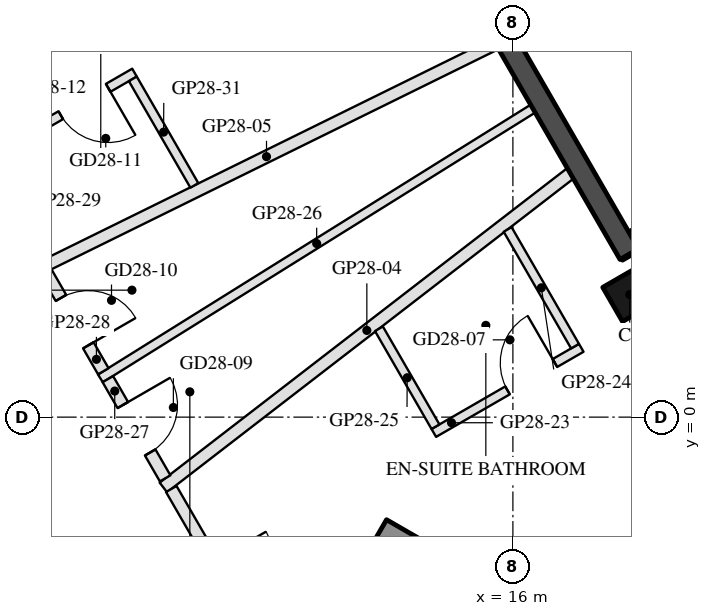
"""IFC4 building model, lengths in metres.
Left out: names, types, materials, properties, quantities, classifications, styles, units other than length and angle.
Written with IfcOpenShell. Run it as: python <this file> out.ifc"""

import sys

from ifc_helpers import new_model, si_unit, direction, frame, frame_2d, origin, origin_2d, place, context, subcontext, project, spatial, rectangle, hollow_rectangle, extrude, boolean, halfspace, element, fill, save


model = new_model("IFC4")
c1 = context("Model", 3, precision=1e-05, world=origin(), true_north=direction((0.0, 1.0)))
c2 = subcontext(c1, "Body", "Model", "MODEL_VIEW")
j1 = project(units=[si_unit("LENGTHUNIT", "METRE"), si_unit("PLANEANGLEUNIT", "RADIAN")], contexts=[c1])
p1 = place(None, origin())
s1 = spatial("IfcSite", under=j1, at=p1, CompositionType="ELEMENT")
p2 = place(p1, origin())
s2 = spatial("IfcBuilding", under=s1, at=p2, CompositionType="ELEMENT")
p3 = place(p2, frame((0.0, 0.0, 280.0)))
s3 = spatial("IfcBuildingStorey", under=s2, at=p3, CompositionType="ELEMENT", Elevation=280.0)
p4 = place(p3, frame((17.922, 2.016, 0.0), z_axis=(0.0, 0.0, 1.0), x_axis=(-0.5, 0.866025403784, 0.0)))
e1 = element("IfcColumn", 1, at=p4, inside=s3, PredefinedType="COLUMN", context=c2, shape_type="SweptSolid", body=[
    boolean("DIFFERENCE", extrude(hollow_rectangle(XDim=0.65, YDim=0.65, WallThickness=0.03, at=origin_2d()), origin(), (0.0, 0.0, 1.0), 3.7), halfspace(frame((0.0, 0.0, 0.04), z_axis=(0.0, 0.0, 1.0), x_axis=(1.0, 0.0, 0.0)), True)),
])
p5 = place(p3, frame((18.772, 3.344, 0.0), z_axis=(0.0, 0.0, 1.0), x_axis=(-0.866005645448, -0.500034220881, 0.0)))
e2 = element("IfcWall", 2, at=p5, inside=s3, PredefinedType="SOLIDWALL", context=c2, shape_type="SweptSolid", body=[
    extrude(rectangle(XDim=1.22, YDim=0.35, at=frame_2d((0.61, 0.0))), origin(), (0.0, 0.0, 1.0), 3.55),
])
p6 = place(p3, frame((17.913, 2.68, 0.0), z_axis=(0.0, 0.0, 1.0), x_axis=(-0.499985371027, 0.866033849661, 0.0)))
e3 = element("IfcWall", 3, at=p6, inside=s3, PredefinedType="SOLIDWALL", context=c2, shape_type="SweptSolid", body=[
    extrude(rectangle(XDim=6.055, YDim=0.35, at=frame_2d((3.028, 0.0))), origin(), (0.0, 0.0, 1.0), 3.55),
])
p7 = place(p6, frame((4.59, 0.0, 0.0)))
e4 = element("IfcOpeningElement", 4, at=p7, cuts=e3, PredefinedType="OPENING", context=c2, shape_type="SweptSolid", body=[
    extrude(rectangle(XDim=1.1, YDim=2.4, at=frame_2d((0.55, 1.2))), frame((0.0, 0.185, 0.0), z_axis=(0.0, -1.0, 0.0), x_axis=(1.0, 0.0, 0.0)), (0.0, 0.0, 1.0), 0.37),
])
p8 = place(p3, frame((13.797, -1.903, 0.0), z_axis=(0.0, 0.0, 1.0), x_axis=(0.866024688907, -0.500001238203, 0.0)))
e5 = element("IfcWall", 5, at=p8, inside=s3, PredefinedType="SHEAR", context=c2, shape_type="SweptSolid", body=[
    extrude(rectangle(XDim=12.129, YDim=0.5, at=frame_2d((6.064, 0.0))), origin(), (0.0, 0.0, 1.0), 3.5),
])
p9 = place(p3, frame((16.945, 4.008, 0.0), z_axis=(0.0, 0.0, 1.0), x_axis=(-0.791722394734, -0.610881043801, 0.0)))
e6 = element("IfcWall", 6, at=p9, inside=s3, PredefinedType="PARTITIONING", context=c2, shape_type="SweptSolid", body=[
    extrude(rectangle(XDim=8.454, YDim=0.2, at=frame_2d((4.227, 0.0))), origin(), (0.0, 0.0, 1.0), 3.16),
])
p10 = place(p3, frame((15.715, 6.139, 0.0), z_axis=(0.0, 0.0, 1.0), x_axis=(-0.897120508699, -0.44178591294, 0.0)))
e7 = element("IfcWall", 7, at=p10, inside=s3, PredefinedType="PARTITIONING", context=c2, shape_type="SweptSolid", body=[
    extrude(rectangle(XDim=8.397, YDim=0.2, at=frame_2d((4.198, 0.0))), origin(), (0.0, 0.0, 1.0), 3.16),
])
p11 = place(p3, frame((14.224, 10.521, 0.0), z_axis=(0.0, 0.0, 1.0), x_axis=(-0.866024341471, -0.500001839976, 0.0)))
e8 = element("IfcWall", 8, at=p11, inside=s3, PredefinedType="PARTITIONING", context=c2, shape_type="SweptSolid", body=[
    extrude(rectangle(XDim=9.279, YDim=0.2, at=frame_2d((4.639, 0.0))), origin(), (0.0, 0.0, 1.0), 3.16),
])
p12 = place(p3, frame((10.382, -1.182, 0.0), z_axis=(0.0, 0.0, 1.0), x_axis=(0.50002859319, -0.866008894869, 0.0)))
e9 = element("IfcWall", 9, at=p12, inside=s3, PredefinedType="PARTITIONING", context=c2, shape_type="SweptSolid", body=[
    extrude(rectangle(XDim=3.774, YDim=0.2, at=frame_2d((1.887, 0.0))), origin(), (0.0, 0.0, 1.0), 3.05),
])
p13 = place(p12, frame((1.387, 0.0, 0.0)))
e10 = element("IfcOpeningElement", 10, at=p13, cuts=e9, PredefinedType="OPENING", context=c2, shape_type="SweptSolid", body=[
    extrude(rectangle(XDim=1.0, YDim=2.1, at=frame_2d((0.5, 1.05))), frame((0.0, 0.11, 0.0), z_axis=(0.0, -1.0, 0.0), x_axis=(1.0, 0.0, 0.0)), (0.0, 0.0, 1.0), 0.22),
])
p14 = place(p3, frame((14.699, -0.26, 0.0), z_axis=(0.0, 0.0, 1.0), x_axis=(0.866034573852, 0.49998411664, 0.0)))
e11 = element("IfcWall", 11, at=p14, inside=s3, PredefinedType="PARTITIONING", context=c2, shape_type="SweptSolid", body=[
    extrude(rectangle(XDim=2.8, YDim=0.15, at=frame_2d((1.4, 0.0))), origin(), (0.0, 0.0, 1.0), 3.55),
])
p15 = place(p14, frame((1.4, 0.0, 0.0)))
e12 = element("IfcOpeningElement", 12, at=p15, cuts=e11, PredefinedType="OPENING", context=c2, shape_type="SweptSolid", body=[
    extrude(rectangle(XDim=0.9, YDim=2.1, at=frame_2d((0.45, 1.05))), frame((0.0, 0.085, 0.0), z_axis=(0.0, -1.0, 0.0), x_axis=(1.0, 0.0, 0.0)), (0.0, 0.0, 1.0), 0.17),
])
p16 = place(p3, frame((17.022, 1.167, 0.0), z_axis=(0.0, 0.0, 1.0), x_axis=(-0.499954515395, 0.866051662741, 0.0)))
e13 = element("IfcWall", 13, at=p16, inside=s3, PredefinedType="PARTITIONING", context=c2, shape_type="SweptSolid", body=[
    extrude(rectangle(XDim=2.216, YDim=0.15, at=frame_2d((1.108, 0.0))), origin(), (0.0, 0.0, 1.0), 3.05),
])
p17 = place(p3, frame((14.727, -0.158, 0.0), z_axis=(0.0, 0.0, 1.0), x_axis=(-0.499964847546, 0.866045698112, 0.0)))
e14 = element("IfcWall", 14, at=p17, inside=s3, PredefinedType="PARTITIONING", context=c2, shape_type="SweptSolid", body=[
    extrude(rectangle(XDim=1.86, YDim=0.15, at=frame_2d((0.93, 0.0))), origin(), (0.0, 0.0, 1.0), 3.05),
])
p18 = place(p3, frame((16.33, 5.074, 0.0), z_axis=(0.0, 0.0, 1.0), x_axis=(-0.848469139967, -0.52924485687, 0.0)))
e15 = element("IfcWall", 15, at=p18, inside=s3, PredefinedType="PARTITIONING", context=c2, shape_type="SweptSolid", body=[
    extrude(rectangle(XDim=8.384, YDim=0.15, at=frame_2d((4.192, 0.0))), origin(), (0.0, 0.0, 1.0), 3.16),
])
p19 = place(p3, frame((9.339, 0.625, 0.0), z_axis=(0.0, 0.0, 1.0), x_axis=(0.499999106059, -0.866025919901, 0.0)))
e16 = element("IfcWall", 16, at=p19, inside=s3, PredefinedType="PARTITIONING", context=c2, shape_type="SweptSolid", body=[
    extrude(rectangle(XDim=1.884, YDim=0.2, at=frame_2d((0.942, 0.0))), origin(), (0.0, 0.0, 1.0), 3.55),
])
p20 = place(p19, frame((0.492, 0.0, 0.0)))
e17 = element("IfcOpeningElement", 17, at=p20, cuts=e16, PredefinedType="OPENING", context=c2, shape_type="SweptSolid", body=[
    extrude(rectangle(XDim=0.9, YDim=2.1, at=frame_2d((0.45, 1.05))), frame((0.0, 0.11, 0.0), z_axis=(0.0, -1.0, 0.0), x_axis=(1.0, 0.0, 0.0)), (0.0, 0.0, 1.0), 0.22),
])
p21 = place(p3, frame((8.321, 2.387, 0.0), z_axis=(0.0, 0.0, 1.0), x_axis=(0.500081217305, -0.865978507874, 0.0)))
e18 = element("IfcWall", 18, at=p21, inside=s3, PredefinedType="PARTITIONING", context=c2, shape_type="SweptSolid", body=[
    extrude(rectangle(XDim=1.885, YDim=0.2, at=frame_2d((0.942, 0.0))), origin(), (0.0, 0.0, 1.0), 3.05),
])
p22 = place(p21, frame((0.492, 0.0, 0.0)))
e19 = element("IfcOpeningElement", 19, at=p22, cuts=e18, PredefinedType="OPENING", context=c2, shape_type="SweptSolid", body=[
    extrude(rectangle(XDim=0.9, YDim=2.1, at=frame_2d((0.45, 1.05))), frame((0.0, 0.11, 0.0), z_axis=(0.0, -1.0, 0.0), x_axis=(1.0, 0.0, 0.0)), (0.0, 0.0, 1.0), 0.22),
])
p23 = place(p3, frame((9.777, 5.666, 0.0), z_axis=(0.0, 0.0, 1.0), x_axis=(-0.865996816683, -0.500049511043, 0.0)))
e20 = element("IfcWall", 20, at=p23, inside=s3, PredefinedType="PARTITIONING", context=c2, shape_type="SweptSolid", body=[
    extrude(rectangle(XDim=2.8, YDim=0.15, at=frame_2d((1.4, 0.0))), origin(), (0.0, 0.0, 1.0), 3.05),
])
p24 = place(p23, frame((0.5, 0.0, 0.0)))
e21 = element("IfcOpeningElement", 21, at=p24, cuts=e20, PredefinedType="OPENING", context=c2, shape_type="SweptSolid", body=[
    extrude(rectangle(XDim=0.9, YDim=2.1, at=frame_2d((0.45, 1.05))), frame((0.0, 0.085, 0.0), z_axis=(0.0, -1.0, 0.0), x_axis=(1.0, 0.0, 0.0)), (0.0, 0.0, 1.0), 0.17),
])
p25 = place(p3, frame((10.761, 3.811, 0.0), z_axis=(0.0, 0.0, 1.0), x_axis=(-0.499941815747, 0.866058993873, 0.0)))
e22 = element("IfcWall", 22, at=p25, inside=s3, PredefinedType="PARTITIONING", context=c2, shape_type="SweptSolid", body=[
    extrude(rectangle(XDim=2.023, YDim=0.15, at=frame_2d((1.012, 0.0))), origin(), (0.0, 0.0, 1.0), 3.05),
])
p26 = place(p15, origin())
e23 = element("IfcDoor", 23, at=p26, inside=s3, OperationType="SINGLE_SWING_RIGHT", PredefinedType="DOOR", context=c2, shape_type="SweptSolid", body=[
    extrude(rectangle(XDim=0.9, YDim=2.1, at=frame_2d((0.45, 1.05))), frame((0.0, 0.025, 0.0), z_axis=(0.0, -1.0, 0.0), x_axis=(1.0, 0.0, 0.0)), (0.0, 0.0, 1.0), 0.05),
])
fill(e12, e23)
p27 = place(p20, origin())
e24 = element("IfcDoor", 24, at=p27, inside=s3, OperationType="SINGLE_SWING_LEFT", PredefinedType="DOOR", context=c2, shape_type="SweptSolid", body=[
    extrude(rectangle(XDim=0.9, YDim=2.1, at=frame_2d((0.45, 1.05))), frame((0.0, 0.025, 0.0), z_axis=(0.0, -1.0, 0.0), x_axis=(1.0, 0.0, 0.0)), (0.0, 0.0, 1.0), 0.05),
])
fill(e17, e24)
p28 = place(p22, origin())
e25 = element("IfcDoor", 25, at=p28, inside=s3, OperationType="SINGLE_SWING_RIGHT", PredefinedType="DOOR", context=c2, shape_type="SweptSolid", body=[
    extrude(rectangle(XDim=0.9, YDim=2.1, at=frame_2d((0.45, 1.05))), frame((0.0, 0.025, 0.0), z_axis=(0.0, -1.0, 0.0), x_axis=(1.0, 0.0, 0.0)), (0.0, 0.0, 1.0), 0.05),
])
fill(e19, e25)
p29 = place(p24, origin())
e26 = element("IfcDoor", 26, at=p29, inside=s3, OperationType="SINGLE_SWING_LEFT", PredefinedType="DOOR", context=c2, shape_type="SweptSolid", body=[
    extrude(rectangle(XDim=0.9, YDim=2.1, at=frame_2d((0.45, 1.05))), frame((0.0, 0.025, 0.0), z_axis=(0.0, -1.0, 0.0), x_axis=(1.0, 0.0, 0.0)), (0.0, 0.0, 1.0), 0.05),
])
fill(e21, e26)
save(model, sys.argv[1])
